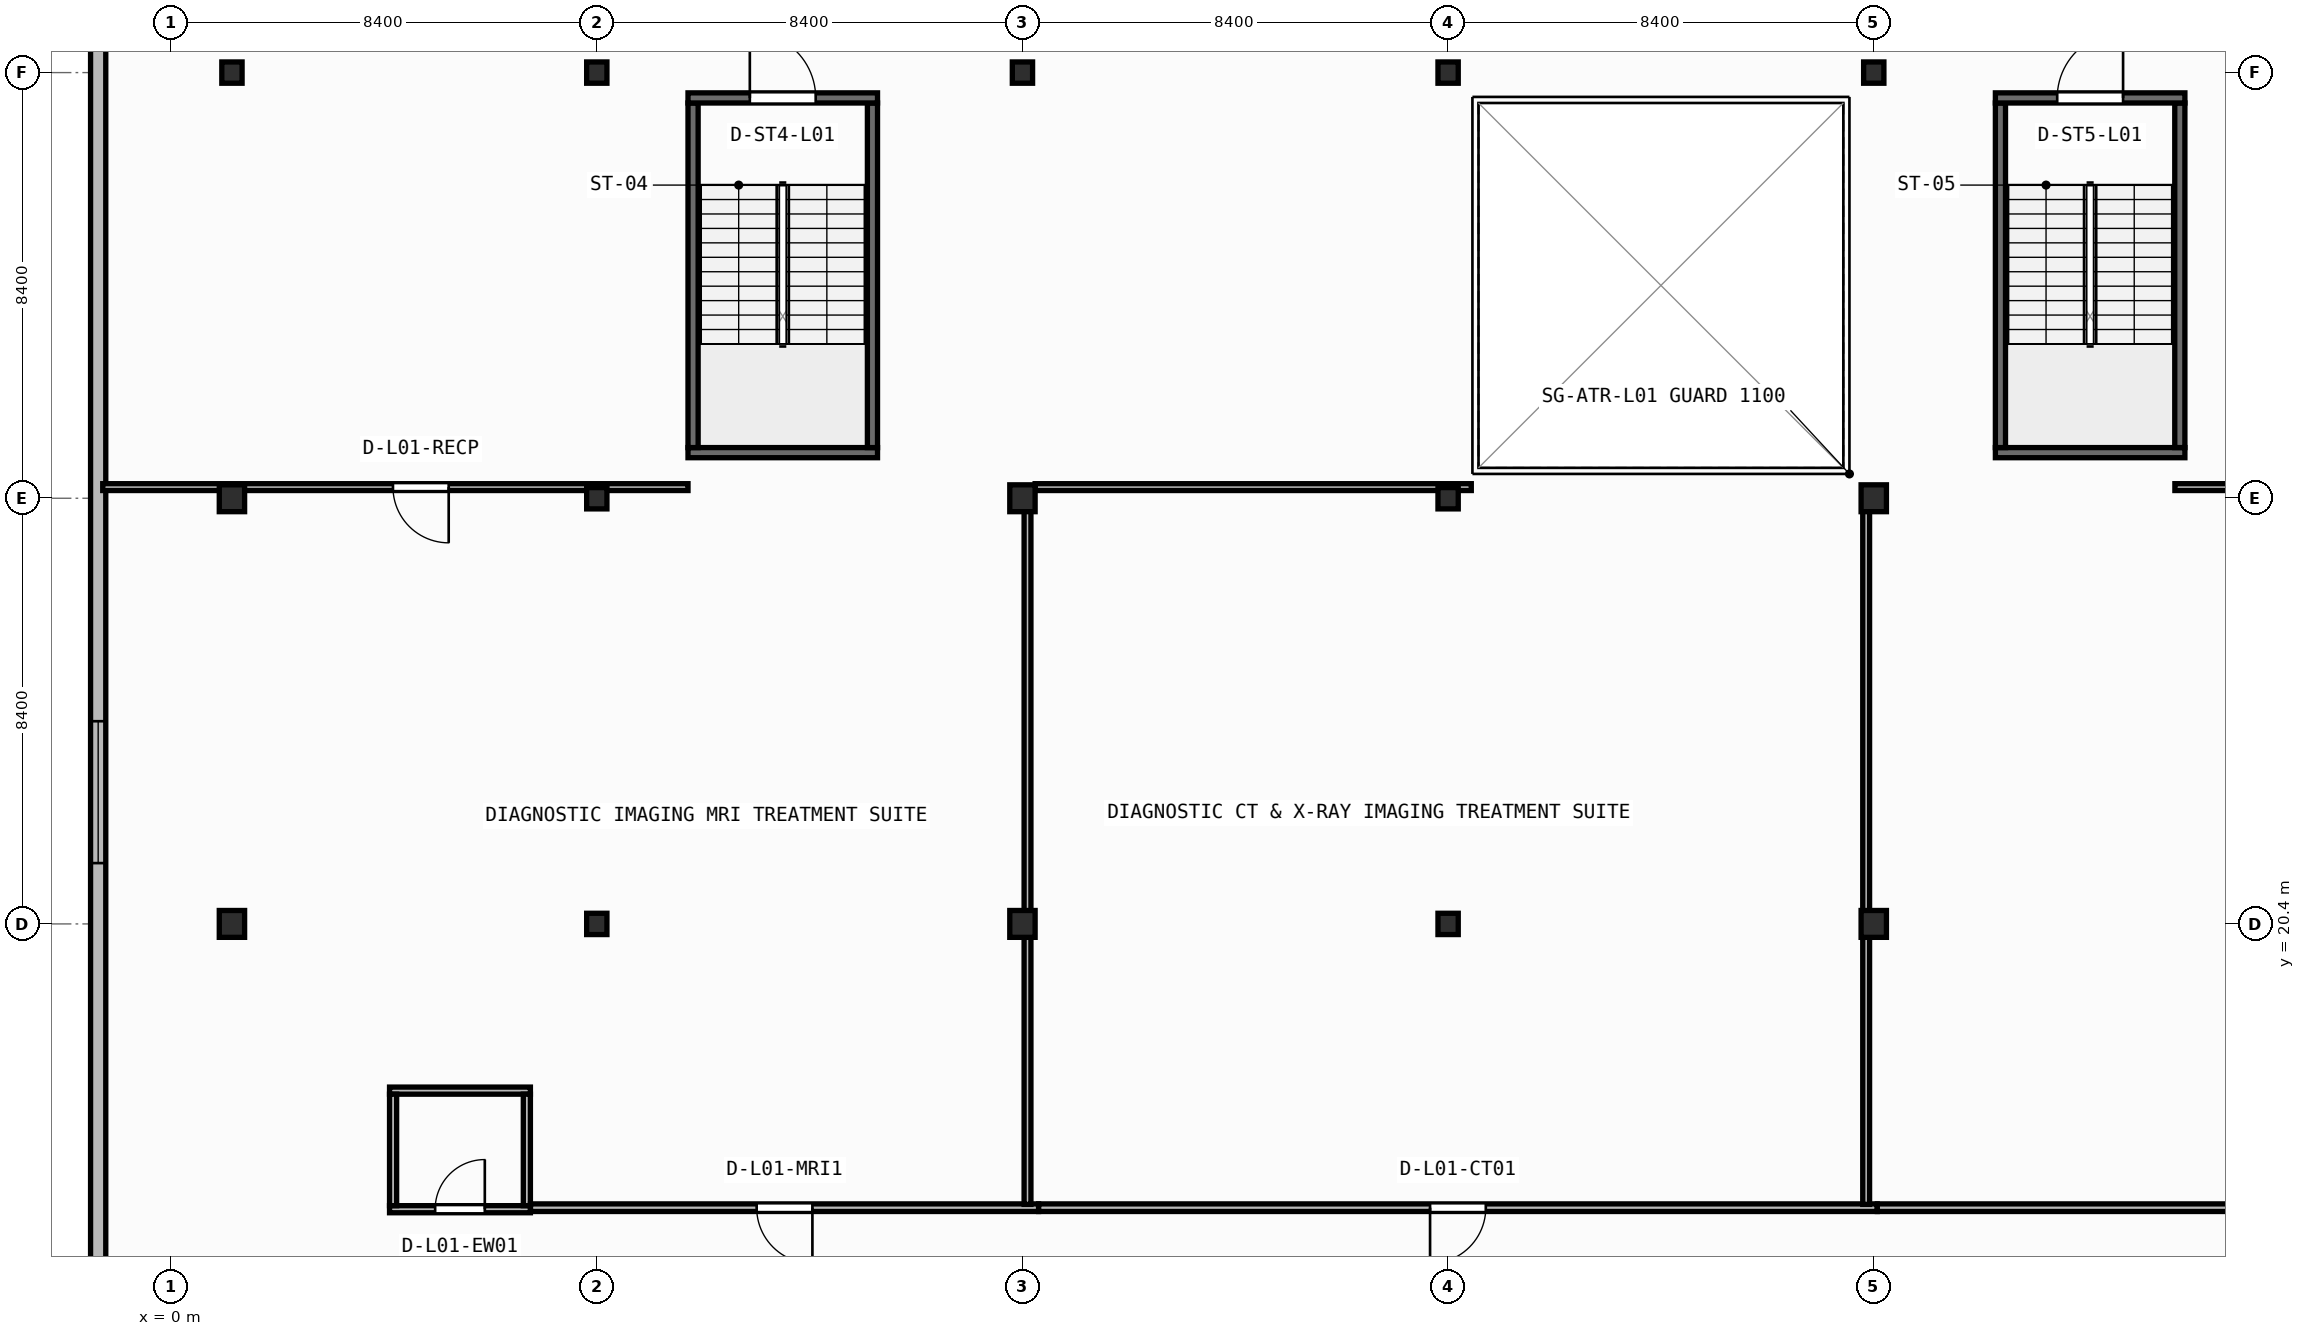
"""IFC4 building model, lengths in metres.
Left out: names, types, materials, properties, quantities, classifications, styles, units other than length and angle.
Written with IfcOpenShell. Run it as: python <this file> out.ifc"""

import sys

from ifc_helpers import new_model, si_unit, direction, frame, frame_2d, origin, origin_2d, place, context, subcontext, project, spatial, rectangle, i_section, extrude, element, fill, save


model = new_model("IFC4")
c1 = context("Model", 3, precision=1e-05, world=origin(), true_north=direction((0.0, 1.0)))
c2 = subcontext(c1, "Body", "Model", "MODEL_VIEW")
j1 = project(units=[si_unit("LENGTHUNIT", "METRE"), si_unit("PLANEANGLEUNIT", "RADIAN")], contexts=[c1])
p1 = place(None, origin())
s1 = spatial("IfcSite", under=j1, at=p1, CompositionType="ELEMENT")
p2 = place(p1, origin())
s2 = spatial("IfcBuilding", under=s1, at=p2, CompositionType="ELEMENT")
p3 = place(p2, frame((0.0, 0.0, 4.5)))
s3 = spatial("IfcBuildingStorey", under=s2, at=p3, CompositionType="ELEMENT", Elevation=4.5)
p4 = place(p3, frame((1.2, 20.4, 0.0), z_axis=(0.0, 0.0, 1.0), x_axis=(1.0, 0.0, 0.0)))
e1 = element("IfcColumn", 1, at=p4, inside=s3, PredefinedType="COLUMN", context=c2, shape_type="SweptSolid", body=[
    extrude(i_section(OverallWidth=0.5, OverallDepth=0.53, WebThickness=0.028, FlangeThickness=0.045, at=origin_2d()), origin(), (0.0, 0.0, 1.0), 4.5),
])
p5 = place(p3, frame((8.4, 20.4, 0.0), z_axis=(0.0, 0.0, 1.0), x_axis=(1.0, 0.0, 0.0)))
e2 = element("IfcColumn", 2, at=p5, inside=s3, PredefinedType="COLUMN", context=c2, shape_type="SweptSolid", body=[
    extrude(i_section(OverallWidth=0.4, OverallDepth=0.42, WebThickness=0.025, FlangeThickness=0.04, at=origin_2d()), origin(), (0.0, 0.0, 1.0), 4.5),
])
p6 = place(p3, frame((16.8, 20.4, 0.0), z_axis=(0.0, 0.0, 1.0), x_axis=(1.0, 0.0, 0.0)))
e3 = element("IfcColumn", 3, at=p6, inside=s3, PredefinedType="COLUMN", context=c2, shape_type="SweptSolid", body=[
    extrude(i_section(OverallWidth=0.5, OverallDepth=0.53, WebThickness=0.028, FlangeThickness=0.045, at=origin_2d()), origin(), (0.0, 0.0, 1.0), 4.5),
])
p7 = place(p3, frame((25.2, 20.4, 0.0), z_axis=(0.0, 0.0, 1.0), x_axis=(1.0, 0.0, 0.0)))
e4 = element("IfcColumn", 4, at=p7, inside=s3, PredefinedType="COLUMN", context=c2, shape_type="SweptSolid", body=[
    extrude(i_section(OverallWidth=0.4, OverallDepth=0.42, WebThickness=0.025, FlangeThickness=0.04, at=origin_2d()), origin(), (0.0, 0.0, 1.0), 4.5),
])
for number, where, z_axis, x_axis in (
    (5, (33.6, 20.4, 0.0), (0.0, 0.0, 1.0), (1.0, 0.0, 0.0)),
    (6, (1.2, 28.8, 0.0), (0.0, 0.0, 1.0), (1.0, 0.0, 0.0)),
):
    element("IfcColumn", number, at=place(p3, frame(where, z_axis=z_axis, x_axis=x_axis)), inside=s3, PredefinedType="COLUMN", context=c2, shape_type="SweptSolid", body=[
        extrude(i_section(OverallWidth=0.5, OverallDepth=0.53, WebThickness=0.028, FlangeThickness=0.045, at=origin_2d()), origin(), (0.0, 0.0, 1.0), 4.5),
    ])
p8 = place(p3, frame((8.4, 28.8, 0.0), z_axis=(0.0, 0.0, 1.0), x_axis=(1.0, 0.0, 0.0)))
e7 = element("IfcColumn", 7, at=p8, inside=s3, PredefinedType="COLUMN", context=c2, shape_type="SweptSolid", body=[
    extrude(i_section(OverallWidth=0.4, OverallDepth=0.42, WebThickness=0.025, FlangeThickness=0.04, at=origin_2d()), origin(), (0.0, 0.0, 1.0), 4.5),
])
p9 = place(p3, frame((16.8, 28.8, 0.0), z_axis=(0.0, 0.0, 1.0), x_axis=(1.0, 0.0, 0.0)))
e8 = element("IfcColumn", 8, at=p9, inside=s3, PredefinedType="COLUMN", context=c2, shape_type="SweptSolid", body=[
    extrude(i_section(OverallWidth=0.5, OverallDepth=0.53, WebThickness=0.028, FlangeThickness=0.045, at=origin_2d()), origin(), (0.0, 0.0, 1.0), 4.5),
])
p10 = place(p3, frame((25.2, 28.8, 0.0), z_axis=(0.0, 0.0, 1.0), x_axis=(1.0, 0.0, 0.0)))
e9 = element("IfcColumn", 9, at=p10, inside=s3, PredefinedType="COLUMN", context=c2, shape_type="SweptSolid", body=[
    extrude(i_section(OverallWidth=0.4, OverallDepth=0.42, WebThickness=0.025, FlangeThickness=0.04, at=origin_2d()), origin(), (0.0, 0.0, 1.0), 4.5),
])
p11 = place(p3, frame((33.6, 28.8, 0.0), z_axis=(0.0, 0.0, 1.0), x_axis=(1.0, 0.0, 0.0)))
e10 = element("IfcColumn", 10, at=p11, inside=s3, PredefinedType="COLUMN", context=c2, shape_type="SweptSolid", body=[
    extrude(i_section(OverallWidth=0.5, OverallDepth=0.53, WebThickness=0.028, FlangeThickness=0.045, at=origin_2d()), origin(), (0.0, 0.0, 1.0), 4.5),
])
for number, where, z_axis, x_axis in (
    (11, (1.2, 37.2, 0.0), (0.0, 0.0, 1.0), (1.0, 0.0, 0.0)),
    (12, (8.4, 37.2, 0.0), (0.0, 0.0, 1.0), (1.0, 0.0, 0.0)),
    (13, (16.8, 37.2, 0.0), (0.0, 0.0, 1.0), (1.0, 0.0, 0.0)),
    (14, (25.2, 37.2, 0.0), (0.0, 0.0, 1.0), (1.0, 0.0, 0.0)),
    (15, (33.6, 37.2, 0.0), (0.0, 0.0, 1.0), (1.0, 0.0, 0.0)),
):
    element("IfcColumn", number, at=place(p3, frame(where, z_axis=z_axis, x_axis=x_axis)), inside=s3, PredefinedType="COLUMN", context=c2, shape_type="SweptSolid", body=[
        extrude(i_section(OverallWidth=0.4, OverallDepth=0.42, WebThickness=0.025, FlangeThickness=0.04, at=origin_2d()), origin(), (0.0, 0.0, 1.0), 4.5),
    ])
p12 = place(p3, frame((-1.44, 45.24, 0.0), z_axis=(0.0, 0.0, 1.0), x_axis=(0.0, -1.0, 0.0)))
e16 = element("IfcWall", 16, at=p12, inside=s3, PredefinedType="STANDARD", context=c2, shape_type="SweptSolid", body=[
    extrude(rectangle(XDim=44.48, YDim=0.3, at=frame_2d((22.24, 0.0))), origin(), (0.0, 0.0, 1.0), 4.25),
])
p13 = place(p12, frame((20.84, 0.0, 0.85)))
e17 = element("IfcOpeningElement", 17, at=p13, cuts=e16, PredefinedType="OPENING", context=c2, shape_type="SweptSolid", body=[
    extrude(rectangle(XDim=2.8, YDim=2.1, at=frame_2d((1.4, 1.05))), frame((0.0, 0.16, 0.0), z_axis=(0.0, -1.0, 0.0), x_axis=(1.0, 0.0, 0.0)), (0.0, 0.0, 1.0), 0.32),
])
p14 = place(p3, frame((10.2, 29.7, 0.0), z_axis=(0.0, 0.0, 1.0), x_axis=(1.0, 0.0, 0.0)))
e18 = element("IfcWall", 18, at=p14, inside=s3, PredefinedType="SHEAR", context=c2, shape_type="SweptSolid", body=[
    extrude(rectangle(XDim=3.74, YDim=0.2, at=frame_2d((1.87, 0.0))), origin(), (0.0, 0.0, 1.0), 4.25),
])
for number, where, z_axis, x_axis in (
    (19, (10.3, 29.8, 0.0), (0.0, 0.0, 1.0), (0.0, 1.0, 0.0)),
    (20, (13.84, 29.8, 0.0), (0.0, 0.0, 1.0), (0.0, 1.0, 0.0)),
):
    element("IfcWall", number, at=place(p3, frame(where, z_axis=z_axis, x_axis=x_axis)), inside=s3, PredefinedType="SHEAR", context=c2, shape_type="SweptSolid", body=[
        extrude(rectangle(XDim=6.8, YDim=0.2, at=frame_2d((3.4, 0.0))), origin(), (0.0, 0.0, 1.0), 4.25),
    ])
p15 = place(p3, frame((10.2, 36.7, 0.0), z_axis=(0.0, 0.0, 1.0), x_axis=(1.0, 0.0, 0.0)))
e21 = element("IfcWall", 21, at=p15, inside=s3, PredefinedType="SHEAR", context=c2, shape_type="SweptSolid", body=[
    extrude(rectangle(XDim=3.74, YDim=0.2, at=frame_2d((1.87, 0.0))), origin(), (0.0, 0.0, 1.0), 4.25),
])
p16 = place(p15, frame((1.22, 0.0, 0.0)))
e22 = element("IfcOpeningElement", 22, at=p16, cuts=e21, PredefinedType="OPENING", context=c2, shape_type="SweptSolid", body=[
    extrude(rectangle(XDim=1.3, YDim=2.15, at=frame_2d((0.65, 1.075))), frame((0.0, 0.11, 0.0), z_axis=(0.0, -1.0, 0.0), x_axis=(1.0, 0.0, 0.0)), (0.0, 0.0, 1.0), 0.22),
])
p17 = place(p3, frame((36.0, 29.7, 0.0), z_axis=(0.0, 0.0, 1.0), x_axis=(1.0, 0.0, 0.0)))
e23 = element("IfcWall", 23, at=p17, inside=s3, PredefinedType="SHEAR", context=c2, shape_type="SweptSolid", body=[
    extrude(rectangle(XDim=3.74, YDim=0.2, at=frame_2d((1.87, 0.0))), origin(), (0.0, 0.0, 1.0), 4.25),
])
for number, where, z_axis, x_axis in (
    (24, (36.1, 29.8, 0.0), (0.0, 0.0, 1.0), (0.0, 1.0, 0.0)),
    (25, (39.64, 29.8, 0.0), (0.0, 0.0, 1.0), (0.0, 1.0, 0.0)),
):
    element("IfcWall", number, at=place(p3, frame(where, z_axis=z_axis, x_axis=x_axis)), inside=s3, PredefinedType="SHEAR", context=c2, shape_type="SweptSolid", body=[
        extrude(rectangle(XDim=6.8, YDim=0.2, at=frame_2d((3.4, 0.0))), origin(), (0.0, 0.0, 1.0), 4.25),
    ])
p18 = place(p3, frame((36.0, 36.7, 0.0), z_axis=(0.0, 0.0, 1.0), x_axis=(1.0, 0.0, 0.0)))
e26 = element("IfcWall", 26, at=p18, inside=s3, PredefinedType="SHEAR", context=c2, shape_type="SweptSolid", body=[
    extrude(rectangle(XDim=3.74, YDim=0.2, at=frame_2d((1.87, 0.0))), origin(), (0.0, 0.0, 1.0), 4.25),
])
p19 = place(p18, frame((1.22, 0.0, 0.0)))
e27 = element("IfcOpeningElement", 27, at=p19, cuts=e26, PredefinedType="OPENING", context=c2, shape_type="SweptSolid", body=[
    extrude(rectangle(XDim=1.3, YDim=2.15, at=frame_2d((0.65, 1.075))), frame((0.0, 0.11, 0.0), z_axis=(0.0, -1.0, 0.0), x_axis=(1.0, 0.0, 0.0)), (0.0, 0.0, 1.0), 0.22),
])
p20 = place(p3, frame((4.31, 14.77, 0.0), z_axis=(0.0, 0.0, 1.0), x_axis=(1.0, 0.0, 0.0)))
e28 = element("IfcWall", 28, at=p20, inside=s3, PredefinedType="PARTITIONING", context=c2, shape_type="SweptSolid", body=[
    extrude(rectangle(XDim=2.78, YDim=0.14, at=frame_2d((1.39, 0.0))), origin(), (0.0, 0.0, 1.0), 4.25),
])
p21 = place(p20, frame((0.9, 0.0, 0.0)))
e29 = element("IfcOpeningElement", 29, at=p21, cuts=e28, PredefinedType="OPENING", context=c2, shape_type="SweptSolid", body=[
    extrude(rectangle(XDim=0.98, YDim=2.1, at=frame_2d((0.49, 1.05))), frame((0.0, 0.08, 0.0), z_axis=(0.0, -1.0, 0.0), x_axis=(1.0, 0.0, 0.0)), (0.0, 0.0, 1.0), 0.16),
])
p22 = place(p3, frame((4.31, 17.11, 0.0), z_axis=(0.0, 0.0, 1.0), x_axis=(1.0, 0.0, 0.0)))
e30 = element("IfcWall", 30, at=p22, inside=s3, PredefinedType="PARTITIONING", context=c2, shape_type="SweptSolid", body=[
    extrude(rectangle(XDim=2.78, YDim=0.14, at=frame_2d((1.39, 0.0))), origin(), (0.0, 0.0, 1.0), 4.25),
])
for number, where, z_axis, x_axis in (
    (31, (4.38, 14.84, 0.0), (0.0, 0.0, 1.0), (0.0, 1.0, 0.0)),
    (32, (7.02, 14.84, 0.0), (0.0, 0.0, 1.0), (0.0, 1.0, 0.0)),
):
    element("IfcWall", number, at=place(p3, frame(where, z_axis=z_axis, x_axis=x_axis)), inside=s3, PredefinedType="PARTITIONING", context=c2, shape_type="SweptSolid", body=[
        extrude(rectangle(XDim=2.2, YDim=0.14, at=frame_2d((1.1, 0.0))), origin(), (0.0, 0.0, 1.0), 4.25),
    ])
p23 = place(p3, frame((17.118, 14.8, 0.0), z_axis=(0.0, 0.0, 1.0), x_axis=(-1.0, 0.0, 0.0)))
e33 = element("IfcWall", 33, at=p23, inside=s3, PredefinedType="PARTITIONING", context=c2, shape_type="SweptSolid", body=[
    extrude(rectangle(XDim=10.026, YDim=0.15, at=frame_2d((5.013, 0.0))), origin(), (0.0, 0.0, 1.0), 4.25),
])
p24 = place(p23, frame((4.463, 0.0, 0.0)))
e34 = element("IfcOpeningElement", 34, at=p24, cuts=e33, PredefinedType="OPENING", context=c2, shape_type="SweptSolid", body=[
    extrude(rectangle(XDim=1.1, YDim=2.1, at=frame_2d((0.55, 1.05))), frame((0.0, 0.085, 0.0), z_axis=(0.0, -1.0, 0.0), x_axis=(1.0, 0.0, 0.0)), (0.0, 0.0, 1.0), 0.17),
])
p25 = place(p3, frame((33.668, 14.8, 0.0), z_axis=(0.0, 0.0, 1.0), x_axis=(-1.0, 0.0, 0.0)))
e35 = element("IfcWall", 35, at=p25, inside=s3, PredefinedType="PARTITIONING", context=c2, shape_type="SweptSolid", body=[
    extrude(rectangle(XDim=16.548, YDim=0.15, at=frame_2d((8.274, 0.0))), origin(), (0.0, 0.0, 1.0), 4.25),
])
p26 = place(p25, frame((7.724, 0.0, 0.0)))
e36 = element("IfcOpeningElement", 36, at=p26, cuts=e35, PredefinedType="OPENING", context=c2, shape_type="SweptSolid", body=[
    extrude(rectangle(XDim=1.1, YDim=2.1, at=frame_2d((0.55, 1.05))), frame((0.0, 0.085, 0.0), z_axis=(0.0, -1.0, 0.0), x_axis=(1.0, 0.0, 0.0)), (0.0, 0.0, 1.0), 0.17),
])
p27 = place(p3, frame((70.168, 14.8, 0.0), z_axis=(0.0, 0.0, 1.0), x_axis=(-1.0, 0.0, 0.0)))
e37 = element("IfcWall", 37, at=p27, inside=s3, PredefinedType="PARTITIONING", context=c2, shape_type="SweptSolid", body=[
    extrude(rectangle(XDim=36.498, YDim=0.15, at=frame_2d((18.249, 0.0))), origin(), (0.0, 0.0, 1.0), 4.25),
])
p28 = place(p27, frame((17.699, 0.0, 0.0)))
e38 = element("IfcOpeningElement", 38, at=p28, cuts=e37, PredefinedType="OPENING", context=c2, shape_type="SweptSolid", body=[
    extrude(rectangle(XDim=1.1, YDim=2.1, at=frame_2d((0.55, 1.05))), frame((0.0, 0.085, 0.0), z_axis=(0.0, -1.0, 0.0), x_axis=(1.0, 0.0, 0.0)), (0.0, 0.0, 1.0), 0.17),
])
p29 = place(p3, frame((16.9, 14.865, 0.0), z_axis=(0.0, 0.0, 1.0), x_axis=(0.0, 1.0, 0.0)))
e39 = element("IfcWall", 39, at=p29, inside=s3, PredefinedType="PARTITIONING", context=c2, shape_type="SweptSolid", body=[
    extrude(rectangle(XDim=14.155, YDim=0.135, at=frame_2d((7.078, 0.0))), origin(), (0.0, 0.0, 1.0), 3.623),
])
p30 = place(p3, frame((10.2, 29.02, 0.0), z_axis=(0.0, 0.0, 1.0), x_axis=(-1.0, 0.0, 0.0)))
e40 = element("IfcWall", 40, at=p30, inside=s3, PredefinedType="PARTITIONING", context=c2, shape_type="SweptSolid", body=[
    extrude(rectangle(XDim=11.55, YDim=0.135, at=frame_2d((5.775, 0.0))), origin(), (0.0, 0.0, 1.0), 3.425),
])
p31 = place(p30, frame((4.722, 0.0, 0.0)))
e41 = element("IfcOpeningElement", 41, at=p31, cuts=e40, PredefinedType="OPENING", context=c2, shape_type="SweptSolid", body=[
    extrude(rectangle(XDim=1.1, YDim=2.1, at=frame_2d((0.55, 1.05))), frame((0.0, 0.077, 0.0), z_axis=(0.0, -1.0, 0.0), x_axis=(1.0, 0.0, 0.0)), (0.0, 0.0, 1.0), 0.155),
])
p32 = place(p3, frame((33.45, 14.865, 0.0), z_axis=(0.0, 0.0, 1.0), x_axis=(0.0, 1.0, 0.0)))
e42 = element("IfcWall", 42, at=p32, inside=s3, PredefinedType="PARTITIONING", context=c2, shape_type="SweptSolid", body=[
    extrude(rectangle(XDim=14.155, YDim=0.135, at=frame_2d((7.078, 0.0))), origin(), (0.0, 0.0, 1.0), 3.623),
])
p33 = place(p3, frame((25.657, 29.02, 0.0), z_axis=(0.0, 0.0, 1.0), x_axis=(-1.0, 0.0, 0.0)))
e43 = element("IfcWall", 43, at=p33, inside=s3, PredefinedType="PARTITIONING", context=c2, shape_type="SweptSolid", body=[
    extrude(rectangle(XDim=8.607, YDim=0.135, at=frame_2d((4.304, 0.0))), origin(), (0.0, 0.0, 1.0), 3.425),
])
p34 = place(p3, frame((70.035, 29.02, 0.0), z_axis=(0.0, 0.0, 1.0), x_axis=(-1.0, 0.0, 0.0)))
e44 = element("IfcWall", 44, at=p34, inside=s3, PredefinedType="PARTITIONING", context=c2, shape_type="SweptSolid", body=[
    extrude(rectangle(XDim=30.492, YDim=0.135, at=frame_2d((15.246, 0.0))), origin(), (0.0, 0.0, 1.0), 3.425),
])
p35 = place(p13, origin())
e45 = element("IfcWindow", 45, at=p35, inside=s3, PartitioningType="SINGLE_PANEL", PredefinedType="WINDOW", context=c2, shape_type="SweptSolid", body=[
    extrude(rectangle(XDim=2.8, YDim=2.1, at=frame_2d((1.4, 1.05))), frame((0.0, 0.03, 0.0), z_axis=(0.0, -1.0, 0.0), x_axis=(1.0, 0.0, 0.0)), (0.0, 0.0, 1.0), 0.06),
])
fill(e17, e45)
p36 = place(p16, origin())
e46 = element("IfcDoor", 46, at=p36, inside=s3, OperationType="SINGLE_SWING_LEFT", PredefinedType="DOOR", context=c2, shape_type="SweptSolid", body=[
    extrude(rectangle(XDim=1.3, YDim=2.15, at=frame_2d((0.65, 1.075))), frame((0.0, 0.025, 0.0), z_axis=(0.0, -1.0, 0.0), x_axis=(1.0, 0.0, 0.0)), (0.0, 0.0, 1.0), 0.05),
])
fill(e22, e46)
p37 = place(p19, origin())
e47 = element("IfcDoor", 47, at=p37, inside=s3, OperationType="SINGLE_SWING_RIGHT", PredefinedType="DOOR", context=c2, shape_type="SweptSolid", body=[
    extrude(rectangle(XDim=1.3, YDim=2.15, at=frame_2d((0.65, 1.075))), frame((0.0, 0.025, 0.0), z_axis=(0.0, -1.0, 0.0), x_axis=(1.0, 0.0, 0.0)), (0.0, 0.0, 1.0), 0.05),
])
fill(e27, e47)
p38 = place(p21, origin())
e48 = element("IfcDoor", 48, at=p38, inside=s3, OperationType="SINGLE_SWING_RIGHT", PredefinedType="DOOR", context=c2, shape_type="SweptSolid", body=[
    extrude(rectangle(XDim=0.98, YDim=2.1, at=frame_2d((0.49, 1.05))), frame((0.0, 0.025, 0.0), z_axis=(0.0, -1.0, 0.0), x_axis=(1.0, 0.0, 0.0)), (0.0, 0.0, 1.0), 0.05),
])
fill(e29, e48)
p39 = place(p24, origin())
e49 = element("IfcDoor", 49, at=p39, inside=s3, OperationType="SINGLE_SWING_LEFT", PredefinedType="DOOR", context=c2, shape_type="SweptSolid", body=[
    extrude(rectangle(XDim=1.1, YDim=2.1, at=frame_2d((0.55, 1.05))), frame((0.0, 0.025, 0.0), z_axis=(0.0, -1.0, 0.0), x_axis=(1.0, 0.0, 0.0)), (0.0, 0.0, 1.0), 0.05),
])
fill(e34, e49)
p40 = place(p26, origin())
e50 = element("IfcDoor", 50, at=p40, inside=s3, OperationType="SINGLE_SWING_RIGHT", PredefinedType="DOOR", context=c2, shape_type="SweptSolid", body=[
    extrude(rectangle(XDim=1.1, YDim=2.1, at=frame_2d((0.55, 1.05))), frame((0.0, 0.025, 0.0), z_axis=(0.0, -1.0, 0.0), x_axis=(1.0, 0.0, 0.0)), (0.0, 0.0, 1.0), 0.05),
])
fill(e36, e50)
p41 = place(p31, origin())
e51 = element("IfcDoor", 51, at=p41, inside=s3, OperationType="SINGLE_SWING_LEFT", PredefinedType="DOOR", context=c2, shape_type="SweptSolid", body=[
    extrude(rectangle(XDim=1.1, YDim=2.1, at=frame_2d((0.55, 1.05))), frame((0.0, 0.025, 0.0), z_axis=(0.0, -1.0, 0.0), x_axis=(1.0, 0.0, 0.0)), (0.0, 0.0, 1.0), 0.05),
])
fill(e41, e51)
save(model, sys.argv[1])
